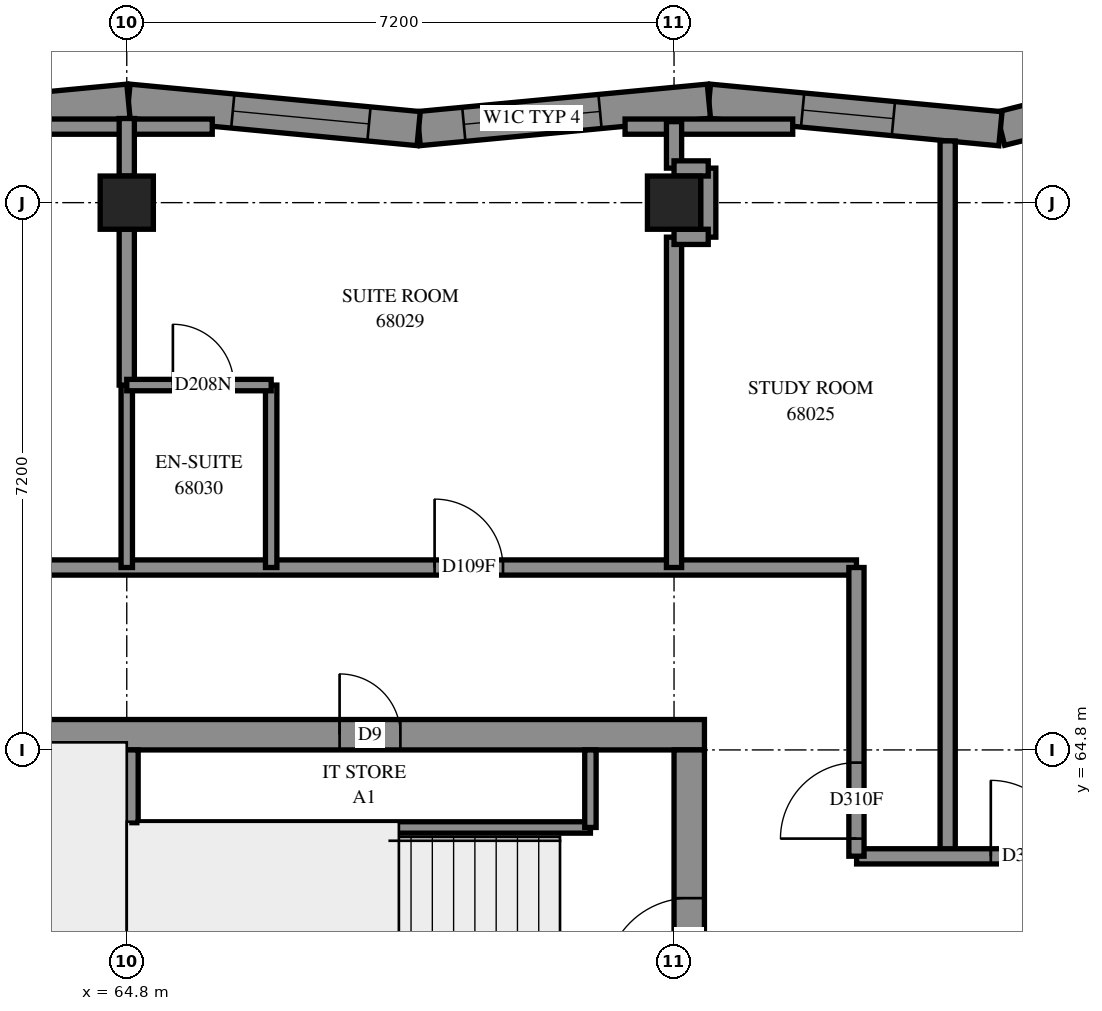
"""IFC4 building model, lengths in metres.
Left out: names, types, materials, properties, quantities, classifications, styles, units other than length and angle.
Written with IfcOpenShell. Run it as: python <this file> out.ifc"""

import sys

from ifc_helpers import new_model, si_unit, direction, frame, frame_2d, origin, origin_2d, place, context, subcontext, project, spatial, polyline, rectangle, outline, extrude, element, fill, save


model = new_model("IFC4")
c1 = context("Model", 3, precision=1e-05, world=origin(), true_north=direction((0.0, 1.0)))
c2 = subcontext(c1, "Body", "Model", "MODEL_VIEW")
j1 = project(units=[si_unit("LENGTHUNIT", "METRE"), si_unit("PLANEANGLEUNIT", "RADIAN")], contexts=[c1])
p1 = place(None, origin())
s1 = spatial("IfcSite", under=j1, at=p1, CompositionType="ELEMENT")
p2 = place(p1, origin())
s2 = spatial("IfcBuilding", under=s1, at=p2, CompositionType="ELEMENT")
p3 = place(p2, frame((0.0, 0.0, 250.6)))
s3 = spatial("IfcBuildingStorey", under=s2, at=p3, CompositionType="ELEMENT", Elevation=250.6)
for number, where, z_axis, x_axis in (
    (1, (64.8, 72.0, 0.0), (0.0, 0.0, 1.0), (1.0, 0.0, 0.0)),
    (2, (72.0, 72.0, 0.0), (0.0, 0.0, 1.0), (1.0, 0.0, 0.0)),
):
    element("IfcColumn", number, at=place(p3, frame(where, z_axis=z_axis, x_axis=x_axis)), inside=s3, PredefinedType="COLUMN", context=c2, shape_type="SweptSolid", body=[
        extrude(rectangle(XDim=0.7, YDim=0.7, at=origin_2d()), origin(), (0.0, 0.0, 1.0), 3.1),
    ])
p4 = place(p3, frame((57.2, 65.0, -0.3), z_axis=(0.0, 0.0, 1.0), x_axis=(1.0, 0.0, 0.0)))
e3 = element("IfcWall", 3, at=p4, inside=s3, PredefinedType="SHEAR", context=c2, shape_type="SweptSolid", body=[
    extrude(rectangle(XDim=15.2, YDim=0.4, at=frame_2d((7.6, 0.0))), origin(), (0.0, 0.0, 1.0), 2.7),
])
p5 = place(p4, frame((10.4, 0.0, 0.3)))
e4 = element("IfcOpeningElement", 4, at=p5, cuts=e3, PredefinedType="OPENING", context=c2, shape_type="SweptSolid", body=[
    extrude(rectangle(XDim=0.8, YDim=2.1, at=frame_2d((0.4, 1.05))), frame((0.0, 0.21, 0.0), z_axis=(0.0, -1.0, 0.0), x_axis=(1.0, 0.0, 0.0)), (0.0, 0.0, 1.0), 0.42),
])
p6 = place(p3, frame((72.2, 50.4, -0.3), z_axis=(0.0, 0.0, 1.0), x_axis=(0.0, 1.0, 0.0)))
e5 = element("IfcWall", 5, at=p6, inside=s3, PredefinedType="SHEAR", context=c2, shape_type="SweptSolid", body=[
    extrude(rectangle(XDim=14.4, YDim=0.4, at=frame_2d((7.2, 0.0))), origin(), (0.0, 0.0, 1.0), 2.7),
])
p7 = place(p6, frame((4.55, 0.0, 0.3)))
e6 = element("IfcOpeningElement", 6, at=p7, cuts=e5, PredefinedType="OPENING", context=c2, shape_type="SweptSolid", body=[
    extrude(rectangle(XDim=1.1, YDim=2.1, at=frame_2d((0.55, 1.05))), frame((0.0, 0.21, 0.0), z_axis=(0.0, -1.0, 0.0), x_axis=(1.0, 0.0, 0.0)), (0.0, 0.0, 1.0), 0.42),
])
p8 = place(p6, frame((11.35, 0.0, 0.3)))
e7 = element("IfcOpeningElement", 7, at=p8, cuts=e5, PredefinedType="OPENING", context=c2, shape_type="SweptSolid", body=[
    extrude(rectangle(XDim=1.1, YDim=2.1, at=frame_2d((0.55, 1.05))), frame((0.0, 0.21, 0.0), z_axis=(0.0, -1.0, 0.0), x_axis=(1.0, 0.0, 0.0)), (0.0, 0.0, 1.0), 0.42),
])
p9 = place(p3, frame((64.8, 60.6, 0.0), z_axis=(0.0, 0.0, 1.0), x_axis=(0.0, 1.0, 0.0)))
e8 = element("IfcWall", 8, at=p9, inside=s3, PredefinedType="SOLIDWALL", context=c2, shape_type="SweptSolid", body=[
    extrude(rectangle(XDim=4.2, YDim=0.3, at=frame_2d((2.1, 0.0))), origin(), (0.0, 0.0, 1.0), 3.1),
])
p10 = place(p3, frame((79.982, 73.9, 0.0), z_axis=(0.0, 0.0, 1.0), x_axis=(-0.9697607809, -0.2440574274, 0.0)))
e9 = element("IfcWall", 9, at=p10, inside=s3, PredefinedType="SOLIDWALL", context=c2, shape_type="SweptSolid", body=[
    extrude(outline(polyline([(-0.173, -0.225), (3.764, -0.225), (3.841, 0.225), (0.173, 0.225), (-0.173, -0.225)])), origin(), (0.0, 0.0, 1.0), 3.1),
])
p11 = place(p10, frame((1.405, 0.0, 0.45)))
e10 = element("IfcOpeningElement", 10, at=p11, cuts=e9, PredefinedType="OPENING", context=c2, shape_type="SweptSolid", body=[
    extrude(rectangle(XDim=1.2, YDim=2.55, at=frame_2d((0.6, 1.275))), frame((0.0, 0.235, 0.0), z_axis=(0.0, -1.0, 0.0), x_axis=(1.0, 0.0, 0.0)), (0.0, 0.0, 1.0), 0.47),
])
p12 = place(p3, frame((76.294, 72.972, 0.0), z_axis=(0.0, 0.0, 1.0), x_axis=(-0.9955612581, 0.0941157869, 0.0)))
e11 = element("IfcWall", 11, at=p12, inside=s3, PredefinedType="SOLIDWALL", context=c2, shape_type="SweptSolid", body=[
    extrude(outline(polyline([(0.039, -0.225), (3.874, -0.225), (3.832, 0.225), (-0.039, 0.225), (0.039, -0.225)])), origin(), (0.0, 0.0, 1.0), 3.1),
])
p13 = place(p12, frame((1.414, 0.0, 0.45)))
e12 = element("IfcOpeningElement", 12, at=p13, cuts=e11, PredefinedType="OPENING", context=c2, shape_type="SweptSolid", body=[
    extrude(rectangle(XDim=1.2, YDim=2.55, at=frame_2d((0.6, 1.275))), frame((0.0, 0.235, 0.0), z_axis=(0.0, -1.0, 0.0), x_axis=(1.0, 0.0, 0.0)), (0.0, 0.0, 1.0), 0.47),
])
p14 = place(p3, frame((72.459, 73.335, 0.0), z_axis=(0.0, 0.0, 1.0), x_axis=(-0.9955603917, -0.0941249513, 0.0)))
e13 = element("IfcWall", 13, at=p14, inside=s3, PredefinedType="SOLIDWALL", context=c2, shape_type="SweptSolid", body=[
    extrude(outline(polyline([(-0.021, -0.225), (3.814, -0.225), (3.857, 0.225), (0.021, 0.225), (-0.021, -0.225)])), origin(), (0.0, 0.0, 1.0), 3.1),
])
p15 = place(p14, frame((1.439, 0.0, 0.7)))
e14 = element("IfcOpeningElement", 14, at=p15, cuts=e13, PredefinedType="OPENING", context=c2, shape_type="SweptSolid", body=[
    extrude(rectangle(XDim=1.8, YDim=2.3, at=frame_2d((0.9, 1.15))), frame((0.0, 0.235, 0.0), z_axis=(0.0, -1.0, 0.0), x_axis=(1.0, 0.0, 0.0)), (0.0, 0.0, 1.0), 0.47),
])
p16 = place(p3, frame((68.64, 72.974, 0.0), z_axis=(0.0, 0.0, 1.0), x_axis=(-0.9955603917, 0.0941249513, 0.0)))
e15 = element("IfcWall", 15, at=p16, inside=s3, PredefinedType="SOLIDWALL", context=c2, shape_type="SweptSolid", body=[
    extrude(outline(polyline([(0.021, -0.225), (3.857, -0.225), (3.814, 0.225), (-0.021, 0.225), (0.021, -0.225)])), origin(), (0.0, 0.0, 1.0), 3.1),
])
p17 = place(p16, frame((0.656, 0.0, 0.7)))
e16 = element("IfcOpeningElement", 16, at=p17, cuts=e15, PredefinedType="OPENING", context=c2, shape_type="SweptSolid", body=[
    extrude(rectangle(XDim=1.8, YDim=2.3, at=frame_2d((0.9, 1.15))), frame((0.0, 0.235, 0.0), z_axis=(0.0, -1.0, 0.0), x_axis=(1.0, 0.0, 0.0)), (0.0, 0.0, 1.0), 0.47),
])
p18 = place(p3, frame((64.822, 73.335, 0.0), z_axis=(0.0, 0.0, 1.0), x_axis=(-0.9955603917, -0.0941249513, 0.0)))
e17 = element("IfcWall", 17, at=p18, inside=s3, PredefinedType="SOLIDWALL", context=c2, shape_type="SweptSolid", body=[
    extrude(outline(polyline([(-0.021, -0.225), (3.814, -0.225), (3.857, 0.225), (0.021, 0.225), (-0.021, -0.225)])), origin(), (0.0, 0.0, 1.0), 3.1),
])
p19 = place(p18, frame((1.379, 0.0, 0.7)))
e18 = element("IfcOpeningElement", 18, at=p19, cuts=e17, PredefinedType="OPENING", context=c2, shape_type="SweptSolid", body=[
    extrude(rectangle(XDim=1.8, YDim=2.3, at=frame_2d((0.9, 1.15))), frame((0.0, 0.235, 0.0), z_axis=(0.0, -1.0, 0.0), x_axis=(1.0, 0.0, 0.0)), (0.0, 0.0, 1.0), 0.47),
])
p20 = place(p3, frame((64.95, 63.78, 0.0), z_axis=(0.0, 0.0, 1.0), x_axis=(1.0, 0.0, 0.0)))
e19 = element("IfcWall", 19, at=p20, inside=s3, PredefinedType="PARTITIONING", context=c2, shape_type="SweptSolid", body=[
    extrude(rectangle(XDim=5.95, YDim=0.15, at=frame_2d((2.975, 0.0))), origin(), (0.0, 0.0, 1.0), 3.1),
])
p21 = place(p3, frame((70.9, 63.78, 0.0), z_axis=(0.0, 0.0, 1.0), x_axis=(0.0, 1.0, 0.0)))
e20 = element("IfcWall", 20, at=p21, inside=s3, PredefinedType="PARTITIONING", context=c2, shape_type="SweptSolid", body=[
    extrude(rectangle(XDim=1.02, YDim=0.15, at=frame_2d((0.51, 0.0))), origin(), (0.0, 0.0, 1.0), 3.1),
])
p22 = place(p3, frame((55.2, 67.2, 0.0), z_axis=(0.0, 0.0, 1.0), x_axis=(1.0, 0.0, 0.0)))
e21 = element("IfcWall", 21, at=p22, inside=s3, PredefinedType="PARTITIONING", context=c2, shape_type="SweptSolid", body=[
    extrude(rectangle(XDim=19.2, YDim=0.2, at=frame_2d((9.6, 0.0))), origin(), (0.0, 0.0, 1.0), 3.1),
])
p23 = place(p22, frame((6.299, 0.0, 0.0)))
e22 = element("IfcOpeningElement", 22, at=p23, cuts=e21, PredefinedType="OPENING", context=c2, shape_type="SweptSolid", body=[
    extrude(rectangle(XDim=0.9, YDim=2.1, at=frame_2d((0.45, 1.05))), frame((0.0, 0.11, 0.0), z_axis=(0.0, -1.0, 0.0), x_axis=(1.0, 0.0, 0.0)), (0.0, 0.0, 1.0), 0.22),
])
p24 = place(p22, frame((13.65, 0.0, 0.0)))
e23 = element("IfcOpeningElement", 23, at=p24, cuts=e21, PredefinedType="OPENING", context=c2, shape_type="SweptSolid", body=[
    extrude(rectangle(XDim=0.9, YDim=2.1, at=frame_2d((0.45, 1.05))), frame((0.0, 0.11, 0.0), z_axis=(0.0, -1.0, 0.0), x_axis=(1.0, 0.0, 0.0)), (0.0, 0.0, 1.0), 0.22),
])
p25 = place(p3, frame((75.6, 63.4, 0.0), z_axis=(0.0, 0.0, 1.0), x_axis=(0.0, 1.0, 0.0)))
e24 = element("IfcWall", 24, at=p25, inside=s3, PredefinedType="PARTITIONING", context=c2, shape_type="SweptSolid", body=[
    extrude(rectangle(XDim=9.412, YDim=0.2, at=frame_2d((4.706, 0.0))), origin(), (0.0, 0.0, 1.0), 3.1),
])
p26 = place(p3, frame((74.402, 63.4, 0.0), z_axis=(0.0, 0.0, 1.0), x_axis=(1.0, 0.0, 0.0)))
e25 = element("IfcWall", 25, at=p26, inside=s3, PredefinedType="PARTITIONING", context=c2, shape_type="SweptSolid", body=[
    extrude(rectangle(XDim=4.798, YDim=0.2, at=frame_2d((2.399, 0.0))), origin(), (0.0, 0.0, 1.0), 3.1),
])
p27 = place(p26, frame((1.766, 0.0, 0.0)))
e26 = element("IfcOpeningElement", 26, at=p27, cuts=e25, PredefinedType="OPENING", context=c2, shape_type="SweptSolid", body=[
    extrude(rectangle(XDim=1.0, YDim=2.1, at=frame_2d((0.5, 1.05))), frame((0.0, 0.11, 0.0), z_axis=(0.0, -1.0, 0.0), x_axis=(1.0, 0.0, 0.0)), (0.0, 0.0, 1.0), 0.22),
])
p28 = place(p3, frame((72.0, 67.2, 0.0), z_axis=(0.0, 0.0, 1.0), x_axis=(0.0, 1.0, 0.0)))
e27 = element("IfcWall", 27, at=p28, inside=s3, PredefinedType="PARTITIONING", context=c2, shape_type="SweptSolid", body=[
    extrude(rectangle(XDim=4.346, YDim=0.2, at=frame_2d((2.173, 0.0))), origin(), (0.0, 0.0, 1.0), 3.1),
])
p29 = place(p3, frame((74.4, 63.402, 0.0), z_axis=(0.0, 0.0, 1.0), x_axis=(0.0, 1.0, 0.0)))
e28 = element("IfcWall", 28, at=p29, inside=s3, PredefinedType="PARTITIONING", context=c2, shape_type="SweptSolid", body=[
    extrude(rectangle(XDim=3.798, YDim=0.2, at=frame_2d((1.899, 0.0))), origin(), (0.0, 0.0, 1.0), 3.1),
])
p30 = place(p29, frame((0.231, 0.0, 0.0)))
e29 = element("IfcOpeningElement", 29, at=p30, cuts=e28, PredefinedType="OPENING", context=c2, shape_type="SweptSolid", body=[
    extrude(rectangle(XDim=1.0, YDim=2.1, at=frame_2d((0.5, 1.05))), frame((0.0, 0.11, 0.0), z_axis=(0.0, -1.0, 0.0), x_axis=(1.0, 0.0, 0.0)), (0.0, 0.0, 1.0), 0.22),
])
for number, where, z_axis, x_axis in (
    (30, (66.7, 67.2, 0.0), (0.0, 0.0, 1.0), (0.0, 1.0, 0.0)),
    (31, (64.8, 67.2, 0.0), (0.0, 0.0, 1.0), (0.0, 1.0, 0.0)),
):
    element("IfcWall", number, at=place(p3, frame(where, z_axis=z_axis, x_axis=x_axis)), inside=s3, PredefinedType="PARTITIONING", context=c2, shape_type="SweptSolid", body=[
        extrude(rectangle(XDim=2.4, YDim=0.15, at=frame_2d((1.2, 0.0))), origin(), (0.0, 0.0, 1.0), 3.1),
    ])
for number, where, z_axis, x_axis in (
    (32, (63.719, 73.0, 0.0), (0.0, 0.0, 1.0), (1.0, 0.0, 0.0)),
    (33, (71.356, 73.0, 0.0), (0.0, 0.0, 1.0), (1.0, 0.0, 0.0)),
):
    element("IfcWall", number, at=place(p3, frame(where, z_axis=z_axis, x_axis=x_axis)), inside=s3, PredefinedType="PARTITIONING", context=c2, shape_type="SweptSolid", body=[
        extrude(rectangle(XDim=2.206, YDim=0.2, at=frame_2d((1.103, 0.0))), origin(), (0.0, 0.0, 1.0), 3.1),
    ])
p31 = place(p3, frame((64.8, 69.6, 0.0), z_axis=(0.0, 0.0, 1.0), x_axis=(0.0, 1.0, 0.0)))
e34 = element("IfcWall", 34, at=p31, inside=s3, PredefinedType="PARTITIONING", context=c2, shape_type="SweptSolid", body=[
    extrude(rectangle(XDim=2.05, YDim=0.2, at=frame_2d((1.025, 0.0))), origin(), (0.0, 0.0, 1.0), 3.1),
])
p32 = place(p3, frame((64.8, 69.6, 0.0), z_axis=(0.0, 0.0, 1.0), x_axis=(1.0, 0.0, 0.0)))
e35 = element("IfcWall", 35, at=p32, inside=s3, PredefinedType="PARTITIONING", context=c2, shape_type="SweptSolid", body=[
    extrude(rectangle(XDim=1.9, YDim=0.15, at=frame_2d((0.95, 0.0))), origin(), (0.0, 0.0, 1.0), 3.1),
])
p33 = place(p32, frame((0.607, 0.0, 0.0)))
e36 = element("IfcOpeningElement", 36, at=p33, cuts=e35, PredefinedType="OPENING", context=c2, shape_type="SweptSolid", body=[
    extrude(rectangle(XDim=0.8, YDim=2.1, at=frame_2d((0.4, 1.05))), frame((0.0, 0.085, 0.0), z_axis=(0.0, -1.0, 0.0), x_axis=(1.0, 0.0, 0.0)), (0.0, 0.0, 1.0), 0.17),
])
p34 = place(p3, frame((72.45, 71.546, 0.0), z_axis=(0.0, 0.0, 1.0), x_axis=(0.0, 1.0, 0.0)))
e37 = element("IfcWall", 37, at=p34, inside=s3, PredefinedType="PARTITIONING", context=c2, shape_type="SweptSolid", body=[
    extrude(rectangle(XDim=0.908, YDim=0.2, at=frame_2d((0.454, 0.0))), origin(), (0.0, 0.0, 1.0), 3.1),
])
p35 = place(p3, frame((64.8, 72.35, 0.0), z_axis=(0.0, 0.0, 1.0), x_axis=(0.0, 1.0, 0.0)))
e38 = element("IfcWall", 38, at=p35, inside=s3, PredefinedType="PARTITIONING", context=c2, shape_type="SweptSolid", body=[
    extrude(rectangle(XDim=0.757, YDim=0.2, at=frame_2d((0.379, 0.0))), origin(), (0.0, 0.0, 1.0), 3.1),
])
p36 = place(p3, frame((72.0, 72.454, 0.0), z_axis=(0.0, 0.0, 1.0), x_axis=(0.0, 1.0, 0.0)))
e39 = element("IfcWall", 39, at=p36, inside=s3, PredefinedType="PARTITIONING", context=c2, shape_type="SweptSolid", body=[
    extrude(rectangle(XDim=0.612, YDim=0.2, at=frame_2d((0.306, 0.0))), origin(), (0.0, 0.0, 1.0), 3.1),
])
for number, where, z_axis, x_axis in (
    (40, (72.0, 71.55, 0.0), (0.0, 0.0, 1.0), (1.0, 0.0, 0.0)),
    (41, (72.0, 72.45, 0.0), (0.0, 0.0, 1.0), (1.0, 0.0, 0.0)),
):
    element("IfcWall", number, at=place(p3, frame(where, z_axis=z_axis, x_axis=x_axis)), inside=s3, PredefinedType="PARTITIONING", context=c2, shape_type="SweptSolid", body=[
        extrude(rectangle(XDim=0.45, YDim=0.2, at=frame_2d((0.225, 0.0))), origin(), (0.0, 0.0, 1.0), 3.1),
    ])
p37 = place(p13, origin())
e42 = element("IfcWindow", 42, at=p37, inside=s3, PartitioningType="SINGLE_PANEL", PredefinedType="WINDOW", context=c2, shape_type="SweptSolid", body=[
    extrude(rectangle(XDim=1.2, YDim=2.55, at=frame_2d((0.6, 1.275))), frame((0.0, 0.205, 0.0), z_axis=(0.0, -1.0, 0.0), x_axis=(1.0, 0.0, 0.0)), (0.0, 0.0, 1.0), 0.06),
])
fill(e12, e42)
p38 = place(p5, origin())
e43 = element("IfcDoor", 43, at=p38, inside=s3, OperationType="SINGLE_SWING_RIGHT", PredefinedType="DOOR", context=c2, shape_type="SweptSolid", body=[
    extrude(rectangle(XDim=0.8, YDim=2.1, at=frame_2d((0.4, 1.05))), frame((0.0, 0.025, 0.0), z_axis=(0.0, -1.0, 0.0), x_axis=(1.0, 0.0, 0.0)), (0.0, 0.0, 1.0), 0.05),
])
fill(e4, e43)
p39 = place(p8, origin())
e44 = element("IfcDoor", 44, at=p39, inside=s3, OperationType="SINGLE_SWING_RIGHT", PredefinedType="DOOR", context=c2, shape_type="SweptSolid", body=[
    extrude(rectangle(XDim=1.1, YDim=2.1, at=frame_2d((0.55, 1.05))), frame((0.0, 0.025, 0.0), z_axis=(0.0, -1.0, 0.0), x_axis=(1.0, 0.0, 0.0)), (0.0, 0.0, 1.0), 0.05),
])
fill(e7, e44)
p40 = place(p30, origin())
e45 = element("IfcDoor", 45, at=p40, inside=s3, OperationType="SINGLE_SWING_RIGHT", PredefinedType="DOOR", context=c2, shape_type="SweptSolid", body=[
    extrude(rectangle(XDim=1.0, YDim=2.1, at=frame_2d((0.5, 1.05))), frame((0.0, 0.025, 0.0), z_axis=(0.0, -1.0, 0.0), x_axis=(1.0, 0.0, 0.0)), (0.0, 0.0, 1.0), 0.05),
])
fill(e29, e45)
p41 = place(p27, origin())
e46 = element("IfcDoor", 46, at=p41, inside=s3, OperationType="SINGLE_SWING_LEFT", PredefinedType="DOOR", context=c2, shape_type="SweptSolid", body=[
    extrude(rectangle(XDim=1.0, YDim=2.1, at=frame_2d((0.5, 1.05))), frame((0.0, 0.025, 0.0), z_axis=(0.0, -1.0, 0.0), x_axis=(1.0, 0.0, 0.0)), (0.0, 0.0, 1.0), 0.05),
])
fill(e26, e46)
p42 = place(p24, origin())
e47 = element("IfcDoor", 47, at=p42, inside=s3, OperationType="SINGLE_SWING_RIGHT", PredefinedType="DOOR", context=c2, shape_type="SweptSolid", body=[
    extrude(rectangle(XDim=0.9, YDim=2.1, at=frame_2d((0.45, 1.05))), frame((0.0, 0.025, 0.0), z_axis=(0.0, -1.0, 0.0), x_axis=(1.0, 0.0, 0.0)), (0.0, 0.0, 1.0), 0.05),
])
fill(e23, e47)
p43 = place(p33, origin())
e48 = element("IfcDoor", 48, at=p43, inside=s3, OperationType="SINGLE_SWING_RIGHT", PredefinedType="DOOR", context=c2, shape_type="SweptSolid", body=[
    extrude(rectangle(XDim=0.8, YDim=2.1, at=frame_2d((0.4, 1.05))), frame((0.0, 0.025, 0.0), z_axis=(0.0, -1.0, 0.0), x_axis=(1.0, 0.0, 0.0)), (0.0, 0.0, 1.0), 0.05),
])
fill(e36, e48)
p44 = place(p15, origin())
e49 = element("IfcWindow", 49, at=p44, inside=s3, PartitioningType="SINGLE_PANEL", PredefinedType="WINDOW", context=c2, shape_type="SweptSolid", body=[
    extrude(rectangle(XDim=1.8, YDim=2.3, at=frame_2d((0.9, 1.15))), frame((0.0, 0.205, 0.0), z_axis=(0.0, -1.0, 0.0), x_axis=(1.0, 0.0, 0.0)), (0.0, 0.0, 1.0), 0.06),
])
fill(e14, e49)
p45 = place(p17, origin())
e50 = element("IfcWindow", 50, at=p45, inside=s3, PartitioningType="SINGLE_PANEL", PredefinedType="WINDOW", context=c2, shape_type="SweptSolid", body=[
    extrude(rectangle(XDim=1.8, YDim=2.3, at=frame_2d((0.9, 1.15))), frame((0.0, 0.205, 0.0), z_axis=(0.0, -1.0, 0.0), x_axis=(1.0, 0.0, 0.0)), (0.0, 0.0, 1.0), 0.06),
])
fill(e16, e50)
save(model, sys.argv[1])
